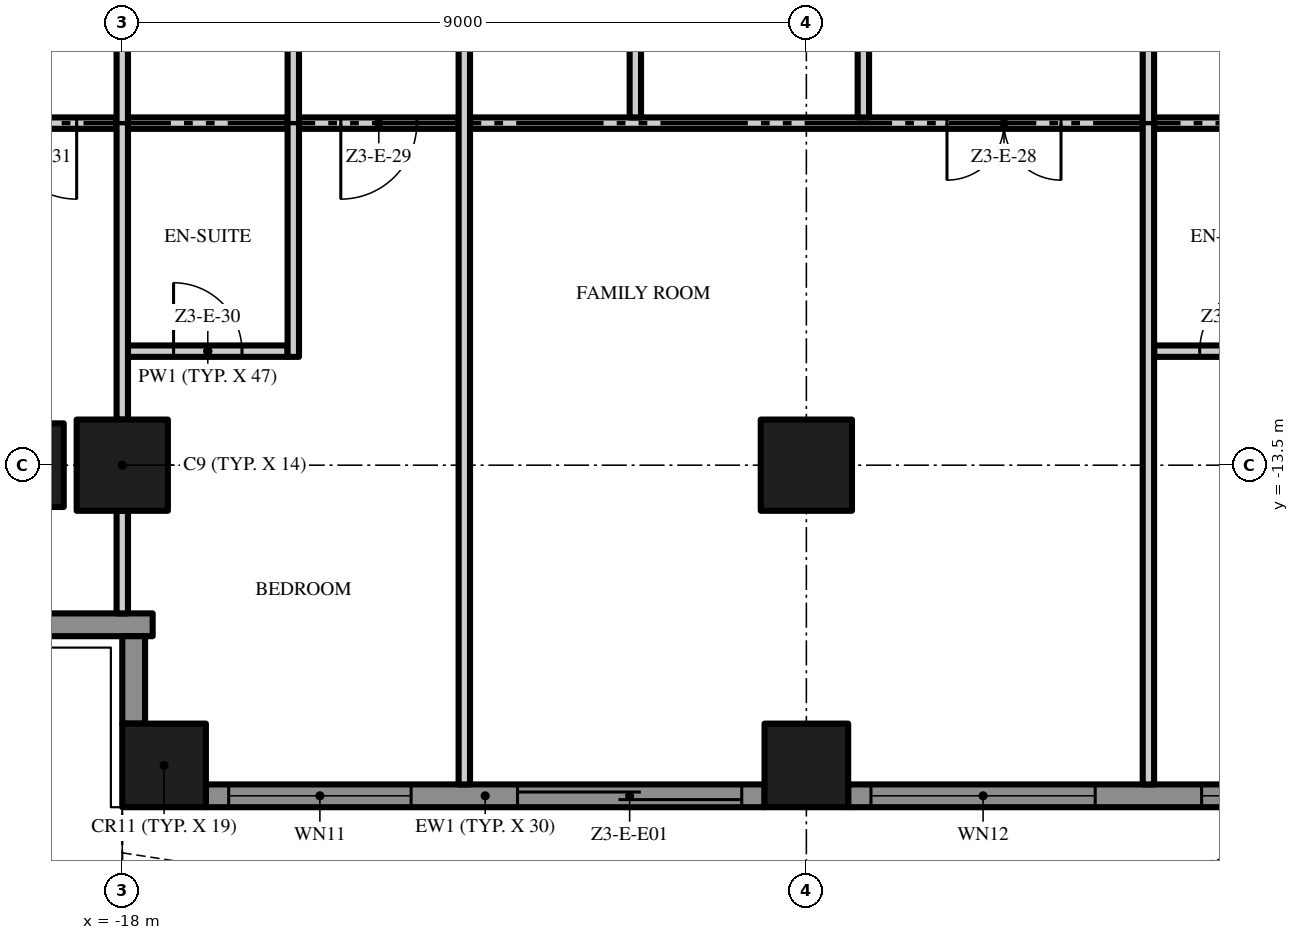
"""IFC4 building model, lengths in metres.
Left out: names, types, materials, properties, quantities, classifications, styles, units other than length and angle.
Written with IfcOpenShell. Run it as: python <this file> out.ifc"""

import sys

from ifc_helpers import new_model, si_unit, direction, frame, frame_2d, origin, origin_2d, place, context, subcontext, project, spatial, polyline, rectangle, outline, extrude, element, fill, save


model = new_model("IFC4")
c1 = context("Model", 3, precision=1e-05, world=origin(), true_north=direction((0.0, 1.0)))
c2 = subcontext(c1, "Body", "Model", "MODEL_VIEW")
j1 = project(units=[si_unit("LENGTHUNIT", "METRE"), si_unit("PLANEANGLEUNIT", "RADIAN")], contexts=[c1])
p1 = place(None, origin())
s1 = spatial("IfcSite", under=j1, at=p1, CompositionType="ELEMENT")
p2 = place(p1, origin())
s2 = spatial("IfcBuilding", under=s1, at=p2, CompositionType="ELEMENT")
p3 = place(p2, frame((0.0, 0.0, 166.8)))
s3 = spatial("IfcBuildingStorey", under=s2, at=p3, CompositionType="ELEMENT", Elevation=166.8)
p4 = place(p3, frame((-18.0, -13.5, 0.0), z_axis=(0.0, 0.0, 1.0), x_axis=(1.0, 0.0, 0.0)))
e1 = element("IfcColumn", 1, at=p4, inside=s3, PredefinedType="COLUMN", context=c2, shape_type="SweptSolid", body=[
    extrude(rectangle(XDim=1.2, YDim=1.2, at=origin_2d()), origin(), (0.0, 0.0, 1.0), 3.5),
])
for number, where, z_axis, x_axis in (
    (2, (-17.45, -17.45, 0.0), (0.0, 0.0, 1.0), (1.0, 0.0, 0.0)),
    (3, (-19.32, -13.5, 0.0), (0.0, 0.0, 1.0), (1.0, 0.0, 0.0)),
):
    element("IfcColumn", number, at=place(p3, frame(where, z_axis=z_axis, x_axis=x_axis)), inside=s3, PredefinedType="COLUMN", context=c2, shape_type="SweptSolid", body=[
        extrude(rectangle(XDim=1.1, YDim=1.1, at=origin_2d()), origin(), (0.0, 0.0, 1.0), 3.5),
    ])
p5 = place(p3, frame((-9.0, -13.5, 0.0), z_axis=(0.0, 0.0, 1.0), x_axis=(1.0, 0.0, 0.0)))
e4 = element("IfcColumn", 4, at=p5, inside=s3, PredefinedType="COLUMN", context=c2, shape_type="SweptSolid", body=[
    extrude(rectangle(XDim=1.2, YDim=1.2, at=origin_2d()), origin(), (0.0, 0.0, 1.0), 3.5),
])
p6 = place(p3, frame((-9.0, -17.45, 0.0), z_axis=(0.0, 0.0, 1.0), x_axis=(1.0, 0.0, 0.0)))
e5 = element("IfcColumn", 5, at=p6, inside=s3, PredefinedType="COLUMN", context=c2, shape_type="SweptSolid", body=[
    extrude(rectangle(XDim=1.1, YDim=1.1, at=origin_2d()), origin(), (0.0, 0.0, 1.0), 3.5),
])
p7 = place(p3, frame((-9.55, -17.85, 0.0), z_axis=(0.0, 0.0, 1.0), x_axis=(-1.0, 0.0, 0.0)))
e6 = element("IfcWall", 6, at=p7, inside=s3, PredefinedType="SOLIDWALL", context=c2, shape_type="SweptSolid", body=[
    extrude(rectangle(XDim=7.35, YDim=0.3, at=frame_2d((3.675, 0.0))), origin(), (0.0, 0.0, 1.0), 3.5),
])
p8 = place(p7, frame((4.65, 0.0, 0.45)))
e7 = element("IfcOpeningElement", 7, at=p8, cuts=e6, PredefinedType="OPENING", context=c2, shape_type="SweptSolid", body=[
    extrude(rectangle(XDim=2.4, YDim=2.65, at=frame_2d((1.2, 1.325))), frame((0.0, 0.16, 0.0), z_axis=(0.0, -1.0, 0.0), x_axis=(1.0, 0.0, 0.0)), (0.0, 0.0, 1.0), 0.32),
])
p9 = place(p7, frame((0.3, 0.0, 0.0)))
e8 = element("IfcOpeningElement", 8, at=p9, cuts=e6, PredefinedType="OPENING", context=c2, shape_type="SweptSolid", body=[
    extrude(rectangle(XDim=2.95, YDim=2.4, at=frame_2d((1.475, 1.2))), frame((0.0, 0.16, 0.0), z_axis=(0.0, -1.0, 0.0), x_axis=(1.0, 0.0, 0.0)), (0.0, 0.0, 1.0), 0.32),
])
p10 = place(p3, frame((-0.55, -17.85, 0.0), z_axis=(0.0, 0.0, 1.0), x_axis=(-1.0, 0.0, 0.0)))
e9 = element("IfcWall", 9, at=p10, inside=s3, PredefinedType="SOLIDWALL", context=c2, shape_type="SweptSolid", body=[
    extrude(rectangle(XDim=7.9, YDim=0.3, at=frame_2d((3.95, 0.0))), origin(), (0.0, 0.0, 1.0), 3.5),
])
p11 = place(p10, frame((4.65, 0.0, 0.45)))
e10 = element("IfcOpeningElement", 10, at=p11, cuts=e9, PredefinedType="OPENING", context=c2, shape_type="SweptSolid", body=[
    extrude(rectangle(XDim=2.95, YDim=2.65, at=frame_2d((1.475, 1.325))), frame((0.0, 0.16, 0.0), z_axis=(0.0, -1.0, 0.0), x_axis=(1.0, 0.0, 0.0)), (0.0, 0.0, 1.0), 0.32),
])
p12 = place(p10, frame((0.3, 0.0, 0.45)))
e11 = element("IfcOpeningElement", 11, at=p12, cuts=e9, PredefinedType="OPENING", context=c2, shape_type="SweptSolid", body=[
    extrude(rectangle(XDim=2.95, YDim=2.65, at=frame_2d((1.475, 1.325))), frame((0.0, 0.16, 0.0), z_axis=(0.0, -1.0, 0.0), x_axis=(1.0, 0.0, 0.0)), (0.0, 0.0, 1.0), 0.32),
])
p13 = place(p3, frame((-17.6, -15.6, 0.0), z_axis=(0.0, 0.0, 1.0), x_axis=(-1.0, 0.0, 0.0)))
e12 = element("IfcWall", 12, at=p13, inside=s3, PredefinedType="SOLIDWALL", context=c2, shape_type="SweptSolid", body=[
    extrude(rectangle(XDim=2.35, YDim=0.3, at=frame_2d((1.175, 0.0))), origin(), (0.0, 0.0, 1.0), 3.5),
])
p14 = place(p3, frame((-17.85, -16.9, 0.0), z_axis=(0.0, 0.0, 1.0), x_axis=(0.0, 1.0, 0.0)))
e13 = element("IfcWall", 13, at=p14, inside=s3, PredefinedType="SOLIDWALL", context=c2, shape_type="SweptSolid", body=[
    extrude(rectangle(XDim=1.15, YDim=0.3, at=frame_2d((0.575, 0.0))), origin(), (0.0, 0.0, 1.0), 3.5),
])
p15 = place(p3, origin())
e14 = element("IfcWall", 14, at=p15, inside=s3, PredefinedType="USERDEFINED", context=c2, shape_type="SweptSolid", body=[
    extrude(outline(polyline([(-18.0, -18.6), (-16.5, -18.829), (-15.0, -19.429), (-13.5, -20.171), (-12.0, -20.771), (-10.5, -21.0), (-9.0, -20.771), (-7.5, -20.171), (-6.0, -19.429), (-4.5, -18.829), (-3.0, -18.6), (-1.5, -18.829), (0.0, -19.429), (1.5, -20.171), (3.0, -20.771), (4.5, -21.0), (6.0, -20.771), (7.5, -20.171), (9.0, -19.429), (10.5, -18.829), (12.0, -18.6), (13.5, -18.829), (15.0, -19.429), (16.5, -20.171), (18.0, -20.771), (18.093, -20.539), (16.602, -19.942), (15.102, -19.201), (13.566, -18.586), (12.0, -18.347), (10.434, -18.586), (8.898, -19.201), (7.398, -19.942), (5.934, -20.528), (4.5, -20.747), (3.066, -20.528), (1.602, -19.942), (0.102, -19.201), (-1.434, -18.586), (-3.0, -18.347), (-4.566, -18.586), (-6.102, -19.201), (-7.602, -19.942), (-9.066, -20.528), (-10.5, -20.747), (-11.934, -20.528), (-13.398, -19.942), (-14.898, -19.201), (-16.434, -18.586), (-17.962, -18.353), (-18.0, -18.6)])), origin(), (0.0, 0.0, 1.0), 0.9),
])
p16 = place(p3, frame((-17.925, -12.0, 0.0), z_axis=(0.0, 0.0, 1.0), x_axis=(1.0, 0.0, 0.0)))
e15 = element("IfcWall", 15, at=p16, inside=s3, PredefinedType="PARTITIONING", context=c2, shape_type="SweptSolid", body=[
    extrude(rectangle(XDim=2.1, YDim=0.15, at=frame_2d((1.05, 0.0))), origin(), (0.0, 0.0, 1.0), 3.5),
])
p17 = place(p16, frame((0.6, 0.0, 0.0)))
e16 = element("IfcOpeningElement", 16, at=p17, cuts=e15, PredefinedType="OPENING", context=c2, shape_type="SweptSolid", body=[
    extrude(rectangle(XDim=0.9, YDim=2.1, at=frame_2d((0.45, 1.05))), frame((0.0, 0.085, 0.0), z_axis=(0.0, -1.0, 0.0), x_axis=(1.0, 0.0, 0.0)), (0.0, 0.0, 1.0), 0.17),
])
p18 = place(p3, frame((-4.425, -12.0, 0.0), z_axis=(0.0, 0.0, 1.0), x_axis=(1.0, 0.0, 0.0)))
e17 = element("IfcWall", 17, at=p18, inside=s3, PredefinedType="PARTITIONING", context=c2, shape_type="SweptSolid", body=[
    extrude(rectangle(XDim=2.1, YDim=0.15, at=frame_2d((1.05, 0.0))), origin(), (0.0, 0.0, 1.0), 3.5),
])
p19 = place(p18, frame((0.6, 0.0, 0.0)))
e18 = element("IfcOpeningElement", 18, at=p19, cuts=e17, PredefinedType="OPENING", context=c2, shape_type="SweptSolid", body=[
    extrude(rectangle(XDim=0.9, YDim=2.1, at=frame_2d((0.45, 1.05))), frame((0.0, 0.085, 0.0), z_axis=(0.0, -1.0, 0.0), x_axis=(1.0, 0.0, 0.0)), (0.0, 0.0, 1.0), 0.17),
])
p20 = place(p3, frame((-18.075, -9.0, 0.0), z_axis=(0.0, 0.0, 1.0), x_axis=(-1.0, 0.0, 0.0)))
e19 = element("IfcWall", 19, at=p20, inside=s3, PredefinedType="PARTITIONING", context=c2, shape_type="SweptSolid", body=[
    extrude(rectangle(XDim=4.125, YDim=0.15, at=frame_2d((2.062, 0.0))), origin(), (0.0, 0.0, 1.0), 3.5),
])
p21 = place(p20, frame((0.525, 0.0, 0.0)))
e20 = element("IfcOpeningElement", 20, at=p21, cuts=e19, PredefinedType="OPENING", context=c2, shape_type="SweptSolid", body=[
    extrude(rectangle(XDim=1.0, YDim=2.4, at=frame_2d((0.5, 1.2))), frame((0.0, 0.085, 0.0), z_axis=(0.0, -1.0, 0.0), x_axis=(1.0, 0.0, 0.0)), (0.0, 0.0, 1.0), 0.17),
])
p22 = place(p3, frame((-17.925, -9.0, 0.0), z_axis=(0.0, 0.0, 1.0), x_axis=(1.0, 0.0, 0.0)))
e21 = element("IfcWall", 21, at=p22, inside=s3, PredefinedType="PARTITIONING", context=c2, shape_type="SweptSolid", body=[
    extrude(rectangle(XDim=2.1, YDim=0.15, at=frame_2d((1.05, 0.0))), origin(), (0.0, 0.0, 1.0), 3.5),
])
p23 = place(p3, frame((-13.575, -9.0, 0.0), z_axis=(0.0, 0.0, 1.0), x_axis=(-1.0, 0.0, 0.0)))
e22 = element("IfcWall", 22, at=p23, inside=s3, PredefinedType="PARTITIONING", context=c2, shape_type="SweptSolid", body=[
    extrude(rectangle(XDim=2.1, YDim=0.15, at=frame_2d((1.05, 0.0))), origin(), (0.0, 0.0, 1.0), 3.5),
])
p24 = place(p23, frame((0.55, 0.0, 0.0)))
e23 = element("IfcOpeningElement", 23, at=p24, cuts=e22, PredefinedType="OPENING", context=c2, shape_type="SweptSolid", body=[
    extrude(rectangle(XDim=1.0, YDim=2.4, at=frame_2d((0.5, 1.2))), frame((0.0, 0.085, 0.0), z_axis=(0.0, -1.0, 0.0), x_axis=(1.0, 0.0, 0.0)), (0.0, 0.0, 1.0), 0.17),
])
p25 = place(p3, frame((-4.575, -9.0, 0.0), z_axis=(0.0, 0.0, 1.0), x_axis=(-1.0, 0.0, 0.0)))
e24 = element("IfcWall", 24, at=p25, inside=s3, PredefinedType="PARTITIONING", context=c2, shape_type="SweptSolid", body=[
    extrude(rectangle(XDim=8.85, YDim=0.15, at=frame_2d((4.425, 0.0))), origin(), (0.0, 0.0, 1.0), 3.5),
])
p26 = place(p25, frame((1.075, 0.0, 0.0)))
e25 = element("IfcOpeningElement", 25, at=p26, cuts=e24, PredefinedType="OPENING", context=c2, shape_type="SweptSolid", body=[
    extrude(rectangle(XDim=1.5, YDim=2.4, at=frame_2d((0.75, 1.2))), frame((0.0, 0.085, 0.0), z_axis=(0.0, -1.0, 0.0), x_axis=(1.0, 0.0, 0.0)), (0.0, 0.0, 1.0), 0.17),
])
p27 = place(p3, frame((-4.425, -9.0, 0.0), z_axis=(0.0, 0.0, 1.0), x_axis=(1.0, 0.0, 0.0)))
e26 = element("IfcWall", 26, at=p27, inside=s3, PredefinedType="PARTITIONING", context=c2, shape_type="SweptSolid", body=[
    extrude(rectangle(XDim=2.1, YDim=0.15, at=frame_2d((1.05, 0.0))), origin(), (0.0, 0.0, 1.0), 3.5),
])
p28 = place(p3, frame((-18.0, -15.45, 0.0), z_axis=(0.0, 0.0, 1.0), x_axis=(0.0, 1.0, 0.0)))
e27 = element("IfcWall", 27, at=p28, inside=s3, PredefinedType="PARTITIONING", context=c2, shape_type="SweptSolid", body=[
    extrude(rectangle(XDim=1.35, YDim=0.15, at=frame_2d((0.675, 0.0))), origin(), (0.0, 0.0, 1.0), 3.5),
])
p29 = place(p3, frame((-18.0, -12.9, 0.0), z_axis=(0.0, 0.0, 1.0), x_axis=(0.0, 1.0, 0.0)))
e28 = element("IfcWall", 28, at=p29, inside=s3, PredefinedType="PARTITIONING", context=c2, shape_type="SweptSolid", body=[
    extrude(rectangle(XDim=7.8, YDim=0.15, at=frame_2d((3.9, 0.0))), origin(), (0.0, 0.0, 1.0), 3.5),
])
p30 = place(p3, frame((-15.75, -12.075, 0.0), z_axis=(0.0, 0.0, 1.0), x_axis=(0.0, 1.0, 0.0)))
e29 = element("IfcWall", 29, at=p30, inside=s3, PredefinedType="PARTITIONING", context=c2, shape_type="SweptSolid", body=[
    extrude(rectangle(XDim=7.65, YDim=0.15, at=frame_2d((3.825, 0.0))), origin(), (0.0, 0.0, 1.0), 3.5),
])
p31 = place(p3, frame((-13.5, -17.7, 0.0), z_axis=(0.0, 0.0, 1.0), x_axis=(0.0, 1.0, 0.0)))
e30 = element("IfcWall", 30, at=p31, inside=s3, PredefinedType="PARTITIONING", context=c2, shape_type="SweptSolid", body=[
    extrude(rectangle(XDim=13.275, YDim=0.15, at=frame_2d((6.638, 0.0))), origin(), (0.0, 0.0, 1.0), 3.5),
])
p32 = place(p3, frame((-11.25, -8.925, 0.0), z_axis=(0.0, 0.0, 1.0), x_axis=(0.0, 1.0, 0.0)))
e31 = element("IfcWall", 31, at=p32, inside=s3, PredefinedType="PARTITIONING", context=c2, shape_type="SweptSolid", body=[
    extrude(rectangle(XDim=4.35, YDim=0.15, at=frame_2d((2.175, 0.0))), origin(), (0.0, 0.0, 1.0), 3.5),
])
p33 = place(p3, frame((-8.25, -8.925, 0.0), z_axis=(0.0, 0.0, 1.0), x_axis=(0.0, 1.0, 0.0)))
e32 = element("IfcWall", 32, at=p33, inside=s3, PredefinedType="PARTITIONING", context=c2, shape_type="SweptSolid", body=[
    extrude(rectangle(XDim=4.5, YDim=0.15, at=frame_2d((2.25, 0.0))), origin(), (0.0, 0.0, 1.0), 3.5),
])
p34 = place(p3, frame((-4.5, -17.7, 0.0), z_axis=(0.0, 0.0, 1.0), x_axis=(0.0, 1.0, 0.0)))
e33 = element("IfcWall", 33, at=p34, inside=s3, PredefinedType="PARTITIONING", context=c2, shape_type="SweptSolid", body=[
    extrude(rectangle(XDim=13.275, YDim=0.15, at=frame_2d((6.638, 0.0))), origin(), (0.0, 0.0, 1.0), 3.5),
])
p35 = place(p8, origin())
e34 = element("IfcWindow", 34, at=p35, inside=s3, PartitioningType="SINGLE_PANEL", PredefinedType="WINDOW", context=c2, shape_type="SweptSolid", body=[
    extrude(rectangle(XDim=2.4, YDim=2.65, at=frame_2d((1.2, 1.325))), frame((0.0, 0.03, 0.0), z_axis=(0.0, -1.0, 0.0), x_axis=(1.0, 0.0, 0.0)), (0.0, 0.0, 1.0), 0.06),
])
fill(e7, e34)
p36 = place(p9, origin())
e35 = element("IfcDoor", 35, at=p36, inside=s3, OperationType="SINGLE_SWING_LEFT", PredefinedType="DOOR", context=c2, shape_type="SweptSolid", body=[
    extrude(rectangle(XDim=2.95, YDim=2.4, at=frame_2d((1.475, 1.2))), frame((0.0, 0.025, 0.0), z_axis=(0.0, -1.0, 0.0), x_axis=(1.0, 0.0, 0.0)), (0.0, 0.0, 1.0), 0.05),
])
fill(e8, e35)
p37 = place(p11, origin())
e36 = element("IfcWindow", 36, at=p37, inside=s3, PartitioningType="SINGLE_PANEL", PredefinedType="WINDOW", context=c2, shape_type="SweptSolid", body=[
    extrude(rectangle(XDim=2.95, YDim=2.65, at=frame_2d((1.475, 1.325))), frame((0.0, 0.03, 0.0), z_axis=(0.0, -1.0, 0.0), x_axis=(1.0, 0.0, 0.0)), (0.0, 0.0, 1.0), 0.06),
])
fill(e10, e36)
p38 = place(p12, origin())
e37 = element("IfcWindow", 37, at=p38, inside=s3, PartitioningType="SINGLE_PANEL", PredefinedType="WINDOW", context=c2, shape_type="SweptSolid", body=[
    extrude(rectangle(XDim=2.95, YDim=2.65, at=frame_2d((1.475, 1.325))), frame((0.0, 0.03, 0.0), z_axis=(0.0, -1.0, 0.0), x_axis=(1.0, 0.0, 0.0)), (0.0, 0.0, 1.0), 0.06),
])
fill(e11, e37)
p39 = place(p19, origin())
e38 = element("IfcDoor", 38, at=p39, inside=s3, OperationType="SINGLE_SWING_RIGHT", PredefinedType="DOOR", context=c2, shape_type="SweptSolid", body=[
    extrude(rectangle(XDim=0.9, YDim=2.1, at=frame_2d((0.45, 1.05))), frame((0.0, 0.025, 0.0), z_axis=(0.0, -1.0, 0.0), x_axis=(1.0, 0.0, 0.0)), (0.0, 0.0, 1.0), 0.05),
])
fill(e18, e38)
p40 = place(p26, origin())
e39 = element("IfcDoor", 39, at=p40, inside=s3, OperationType="DOUBLE_DOOR_SINGLE_SWING", PredefinedType="DOOR", context=c2, shape_type="SweptSolid", body=[
    extrude(rectangle(XDim=1.5, YDim=2.4, at=frame_2d((0.75, 1.2))), frame((0.0, 0.025, 0.0), z_axis=(0.0, -1.0, 0.0), x_axis=(1.0, 0.0, 0.0)), (0.0, 0.0, 1.0), 0.05),
])
fill(e25, e39)
p41 = place(p24, origin())
e40 = element("IfcDoor", 40, at=p41, inside=s3, OperationType="SINGLE_SWING_RIGHT", PredefinedType="DOOR", context=c2, shape_type="SweptSolid", body=[
    extrude(rectangle(XDim=1.0, YDim=2.4, at=frame_2d((0.5, 1.2))), frame((0.0, 0.025, 0.0), z_axis=(0.0, -1.0, 0.0), x_axis=(1.0, 0.0, 0.0)), (0.0, 0.0, 1.0), 0.05),
])
fill(e23, e40)
p42 = place(p17, origin())
e41 = element("IfcDoor", 41, at=p42, inside=s3, OperationType="SINGLE_SWING_LEFT", PredefinedType="DOOR", context=c2, shape_type="SweptSolid", body=[
    extrude(rectangle(XDim=0.9, YDim=2.1, at=frame_2d((0.45, 1.05))), frame((0.0, 0.025, 0.0), z_axis=(0.0, -1.0, 0.0), x_axis=(1.0, 0.0, 0.0)), (0.0, 0.0, 1.0), 0.05),
])
fill(e16, e41)
p43 = place(p21, origin())
e42 = element("IfcDoor", 42, at=p43, inside=s3, OperationType="SINGLE_SWING_LEFT", PredefinedType="DOOR", context=c2, shape_type="SweptSolid", body=[
    extrude(rectangle(XDim=1.0, YDim=2.4, at=frame_2d((0.5, 1.2))), frame((0.0, 0.025, 0.0), z_axis=(0.0, -1.0, 0.0), x_axis=(1.0, 0.0, 0.0)), (0.0, 0.0, 1.0), 0.05),
])
fill(e20, e42)
save(model, sys.argv[1])
